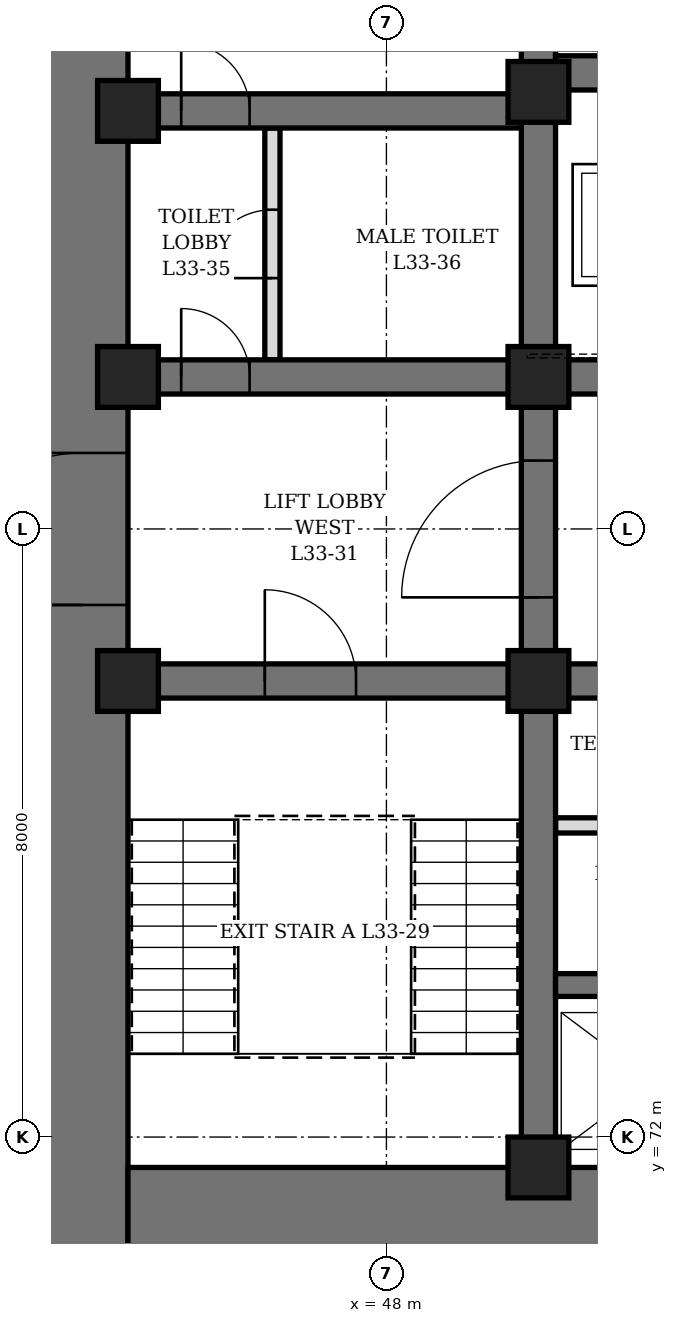
"""IFC4 building model, lengths in metres.
Left out: names, types, materials, properties, quantities, classifications, styles, units other than length and angle.
Written with IfcOpenShell. Run it as: python <this file> out.ifc"""

import sys

from ifc_helpers import new_model, si_unit, direction, frame, frame_2d, origin, origin_2d, place, context, subcontext, project, spatial, rectangle, hollow_rectangle, extrude, element, fill, save


model = new_model("IFC4")
c1 = context("Model", 3, precision=1e-05, world=origin(), true_north=direction((0.0, 1.0)))
c2 = subcontext(c1, "Body", "Model", "MODEL_VIEW")
j1 = project(units=[si_unit("LENGTHUNIT", "METRE"), si_unit("PLANEANGLEUNIT", "RADIAN")], contexts=[c1])
p1 = place(None, origin())
s1 = spatial("IfcSite", under=j1, at=p1, CompositionType="ELEMENT")
p2 = place(p1, origin())
s2 = spatial("IfcBuilding", under=s1, at=p2, CompositionType="ELEMENT")
p3 = place(p2, frame((0.0, 0.0, 150.1)))
s3 = spatial("IfcBuildingStorey", under=s2, at=p3, CompositionType="ELEMENT", Elevation=150.1)
p4 = place(p3, frame((44.0, 70.4, 0.0), z_axis=(0.0, 0.0, 1.0), x_axis=(0.0, 1.0, 0.0)))
e1 = element("IfcWall", 1, at=p4, inside=s3, PredefinedType="SHEAR", context=c2, shape_type="SweptSolid", body=[
    extrude(rectangle(XDim=19.2, YDim=1.2, at=frame_2d((9.6, 0.0))), origin(), (0.0, 0.0, 1.0), 4.2),
])
p5 = place(p4, frame((8.6, 0.0, 0.0)))
e2 = element("IfcOpeningElement", 2, at=p5, cuts=e1, PredefinedType="OPENING", context=c2, shape_type="SweptSolid", body=[
    extrude(rectangle(XDim=2.0, YDim=2.4, at=frame_2d((1.0, 1.2))), frame((0.0, 0.61, 0.0), z_axis=(0.0, -1.0, 0.0), x_axis=(1.0, 0.0, 0.0)), (0.0, 0.0, 1.0), 1.22),
])
p6 = place(p3, frame((44.6, 71.0, 0.0), z_axis=(0.0, 0.0, 1.0), x_axis=(1.0, 0.0, 0.0)))
e3 = element("IfcWall", 3, at=p6, inside=s3, PredefinedType="SHEAR", context=c2, shape_type="SweptSolid", body=[
    extrude(rectangle(XDim=22.8, YDim=1.2, at=frame_2d((11.4, 0.0))), origin(), (0.0, 0.0, 1.0), 4.2),
])
p7 = place(p3, frame((50.0, 71.6, 0.0), z_axis=(0.0, 0.0, 1.0), x_axis=(0.0, 1.0, 0.0)))
e4 = element("IfcWall", 4, at=p7, inside=s3, PredefinedType="SHEAR", context=c2, shape_type="SweptSolid", body=[
    extrude(rectangle(XDim=16.8, YDim=0.45, at=frame_2d((8.4, 0.0))), origin(), (0.0, 0.0, 1.0), 4.2),
])
p8 = place(p7, frame((7.5, 0.0, 0.0)))
e5 = element("IfcOpeningElement", 5, at=p8, cuts=e4, PredefinedType="OPENING", context=c2, shape_type="SweptSolid", body=[
    extrude(rectangle(XDim=1.8, YDim=2.4, at=frame_2d((0.9, 1.2))), frame((0.0, 0.235, 0.0), z_axis=(0.0, -1.0, 0.0), x_axis=(1.0, 0.0, 0.0)), (0.0, 0.0, 1.0), 0.47),
])
p9 = place(p3, frame((44.6, 78.0, 0.0), z_axis=(0.0, 0.0, 1.0), x_axis=(1.0, 0.0, 0.0)))
e6 = element("IfcWall", 6, at=p9, inside=s3, PredefinedType="SHEAR", context=c2, shape_type="SweptSolid", body=[
    extrude(rectangle(XDim=5.175, YDim=0.45, at=frame_2d((2.587, 0.0))), origin(), (0.0, 0.0, 1.0), 4.2),
])
p10 = place(p9, frame((1.8, 0.0, 0.0)))
e7 = element("IfcOpeningElement", 7, at=p10, cuts=e6, PredefinedType="OPENING", context=c2, shape_type="SweptSolid", body=[
    extrude(rectangle(XDim=1.2, YDim=2.1, at=frame_2d((0.6, 1.05))), frame((0.0, 0.235, 0.0), z_axis=(0.0, -1.0, 0.0), x_axis=(1.0, 0.0, 0.0)), (0.0, 0.0, 1.0), 0.47),
])
p11 = place(p3, frame((44.6, 82.0, 0.0), z_axis=(0.0, 0.0, 1.0), x_axis=(1.0, 0.0, 0.0)))
e8 = element("IfcWall", 8, at=p11, inside=s3, PredefinedType="SHEAR", context=c2, shape_type="SweptSolid", body=[
    extrude(rectangle(XDim=5.175, YDim=0.45, at=frame_2d((2.587, 0.0))), origin(), (0.0, 0.0, 1.0), 4.2),
])
p12 = place(p11, frame((0.7, 0.0, 0.0)))
e9 = element("IfcOpeningElement", 9, at=p12, cuts=e8, PredefinedType="OPENING", context=c2, shape_type="SweptSolid", body=[
    extrude(rectangle(XDim=0.9, YDim=2.1, at=frame_2d((0.45, 1.05))), frame((0.0, 0.235, 0.0), z_axis=(0.0, -1.0, 0.0), x_axis=(1.0, 0.0, 0.0)), (0.0, 0.0, 1.0), 0.47),
])
p13 = place(p3, frame((44.6, 85.5, 0.0), z_axis=(0.0, 0.0, 1.0), x_axis=(1.0, 0.0, 0.0)))
e10 = element("IfcWall", 10, at=p13, inside=s3, PredefinedType="SHEAR", context=c2, shape_type="SweptSolid", body=[
    extrude(rectangle(XDim=5.175, YDim=0.45, at=frame_2d((2.587, 0.0))), origin(), (0.0, 0.0, 1.0), 4.2),
])
p14 = place(p13, frame((0.7, 0.0, 0.0)))
e11 = element("IfcOpeningElement", 11, at=p14, cuts=e10, PredefinedType="OPENING", context=c2, shape_type="SweptSolid", body=[
    extrude(rectangle(XDim=0.9, YDim=2.1, at=frame_2d((0.45, 1.05))), frame((0.0, 0.235, 0.0), z_axis=(0.0, -1.0, 0.0), x_axis=(1.0, 0.0, 0.0)), (0.0, 0.0, 1.0), 0.47),
])
p15 = place(p3, frame((50.225, 78.0, 0.0), z_axis=(0.0, 0.0, 1.0), x_axis=(1.0, 0.0, 0.0)))
e12 = element("IfcWall", 12, at=p15, inside=s3, PredefinedType="SHEAR", context=c2, shape_type="SweptSolid", body=[
    extrude(rectangle(XDim=11.55, YDim=0.45, at=frame_2d((5.775, 0.0))), origin(), (0.0, 0.0, 1.0), 4.2),
])
p16 = place(p15, frame((0.825, 0.0, 0.0)))
e13 = element("IfcOpeningElement", 13, at=p16, cuts=e12, PredefinedType="OPENING", context=c2, shape_type="SweptSolid", body=[
    extrude(rectangle(XDim=0.9, YDim=2.1, at=frame_2d((0.45, 1.05))), frame((0.0, 0.235, 0.0), z_axis=(0.0, -1.0, 0.0), x_axis=(1.0, 0.0, 0.0)), (0.0, 0.0, 1.0), 0.47),
])
p17 = place(p15, frame((3.825, 0.0, 0.0)))
e14 = element("IfcOpeningElement", 14, at=p17, cuts=e12, PredefinedType="OPENING", context=c2, shape_type="SweptSolid", body=[
    extrude(rectangle(XDim=0.9, YDim=2.1, at=frame_2d((0.45, 1.05))), frame((0.0, 0.235, 0.0), z_axis=(0.0, -1.0, 0.0), x_axis=(1.0, 0.0, 0.0)), (0.0, 0.0, 1.0), 0.47),
])
p18 = place(p15, frame((6.825, 0.0, 0.0)))
e15 = element("IfcOpeningElement", 15, at=p18, cuts=e12, PredefinedType="OPENING", context=c2, shape_type="SweptSolid", body=[
    extrude(rectangle(XDim=0.9, YDim=2.1, at=frame_2d((0.45, 1.05))), frame((0.0, 0.235, 0.0), z_axis=(0.0, -1.0, 0.0), x_axis=(1.0, 0.0, 0.0)), (0.0, 0.0, 1.0), 0.47),
])
p19 = place(p15, frame((9.825, 0.0, 0.0)))
e16 = element("IfcOpeningElement", 16, at=p19, cuts=e12, PredefinedType="OPENING", context=c2, shape_type="SweptSolid", body=[
    extrude(rectangle(XDim=0.9, YDim=2.1, at=frame_2d((0.45, 1.05))), frame((0.0, 0.235, 0.0), z_axis=(0.0, -1.0, 0.0), x_axis=(1.0, 0.0, 0.0)), (0.0, 0.0, 1.0), 0.47),
])
p20 = place(p3, frame((50.225, 82.0, 0.0), z_axis=(0.0, 0.0, 1.0), x_axis=(1.0, 0.0, 0.0)))
e17 = element("IfcWall", 17, at=p20, inside=s3, PredefinedType="SHEAR", context=c2, shape_type="SweptSolid", body=[
    extrude(rectangle(XDim=11.55, YDim=0.45, at=frame_2d((5.775, 0.0))), origin(), (0.0, 0.0, 1.0), 4.2),
])
p21 = place(p20, frame((0.725, 0.0, 0.0)))
e18 = element("IfcOpeningElement", 18, at=p21, cuts=e17, PredefinedType="OPENING", context=c2, shape_type="SweptSolid", body=[
    extrude(rectangle(XDim=1.1, YDim=2.2, at=frame_2d((0.55, 1.1))), frame((0.0, 0.235, 0.0), z_axis=(0.0, -1.0, 0.0), x_axis=(1.0, 0.0, 0.0)), (0.0, 0.0, 1.0), 0.47),
])
p22 = place(p20, frame((3.725, 0.0, 0.0)))
e19 = element("IfcOpeningElement", 19, at=p22, cuts=e17, PredefinedType="OPENING", context=c2, shape_type="SweptSolid", body=[
    extrude(rectangle(XDim=1.1, YDim=2.2, at=frame_2d((0.55, 1.1))), frame((0.0, 0.235, 0.0), z_axis=(0.0, -1.0, 0.0), x_axis=(1.0, 0.0, 0.0)), (0.0, 0.0, 1.0), 0.47),
])
p23 = place(p20, frame((6.725, 0.0, 0.0)))
e20 = element("IfcOpeningElement", 20, at=p23, cuts=e17, PredefinedType="OPENING", context=c2, shape_type="SweptSolid", body=[
    extrude(rectangle(XDim=1.1, YDim=2.2, at=frame_2d((0.55, 1.1))), frame((0.0, 0.235, 0.0), z_axis=(0.0, -1.0, 0.0), x_axis=(1.0, 0.0, 0.0)), (0.0, 0.0, 1.0), 0.47),
])
p24 = place(p20, frame((9.725, 0.0, 0.0)))
e21 = element("IfcOpeningElement", 21, at=p24, cuts=e17, PredefinedType="OPENING", context=c2, shape_type="SweptSolid", body=[
    extrude(rectangle(XDim=1.1, YDim=2.2, at=frame_2d((0.55, 1.1))), frame((0.0, 0.235, 0.0), z_axis=(0.0, -1.0, 0.0), x_axis=(1.0, 0.0, 0.0)), (0.0, 0.0, 1.0), 0.47),
])
p25 = place(p3, frame((50.225, 86.0, 0.0), z_axis=(0.0, 0.0, 1.0), x_axis=(1.0, 0.0, 0.0)))
e22 = element("IfcWall", 22, at=p25, inside=s3, PredefinedType="SHEAR", context=c2, shape_type="SweptSolid", body=[
    extrude(rectangle(XDim=11.55, YDim=0.45, at=frame_2d((5.775, 0.0))), origin(), (0.0, 0.0, 1.0), 4.2),
])
p26 = place(p3, frame((50.225, 74.0, 0.0), z_axis=(0.0, 0.0, 1.0), x_axis=(1.0, 0.0, 0.0)))
e23 = element("IfcWall", 23, at=p26, inside=s3, PredefinedType="SHEAR", context=c2, shape_type="SweptSolid", body=[
    extrude(rectangle(XDim=11.55, YDim=0.3, at=frame_2d((5.775, 0.0))), origin(), (0.0, 0.0, 1.0), 4.2),
])
for number, where, z_axis, x_axis in (
    (24, (44.6, 78.0, 0.0), (0.0, 0.0, 1.0), (1.0, 0.0, 0.0)),
    (25, (44.6, 82.0, 0.0), (0.0, 0.0, 1.0), (1.0, 0.0, 0.0)),
    (26, (44.6, 85.5, 0.0), (0.0, 0.0, 1.0), (1.0, 0.0, 0.0)),
    (27, (50.0, 71.6, 0.0), (0.0, 0.0, 1.0), (1.0, 0.0, 0.0)),
    (28, (50.0, 78.0, 0.0), (0.0, 0.0, 1.0), (1.0, 0.0, 0.0)),
    (29, (50.0, 82.0, 0.0), (0.0, 0.0, 1.0), (1.0, 0.0, 0.0)),
    (30, (50.0, 85.75, 0.0), (0.0, 0.0, 1.0), (1.0, 0.0, 0.0)),
):
    element("IfcColumn", number, at=place(p3, frame(where, z_axis=z_axis, x_axis=x_axis)), inside=s3, PredefinedType="COLUMN", context=c2, shape_type="SweptSolid", body=[
        extrude(hollow_rectangle(XDim=0.8, YDim=0.8, WallThickness=0.1, at=origin_2d()), origin(), (0.0, 0.0, 1.0), 4.2),
    ])
p27 = place(p3, frame((46.5, 82.225, 0.0), z_axis=(0.0, 0.0, 1.0), x_axis=(0.0, 1.0, 0.0)))
e31 = element("IfcWall", 31, at=p27, inside=s3, PredefinedType="PARTITIONING", context=c2, shape_type="SweptSolid", body=[
    extrude(rectangle(XDim=3.05, YDim=0.2, at=frame_2d((1.525, 0.0))), origin(), (0.0, 0.0, 1.0), 4.04),
])
p28 = place(p27, frame((1.075, 0.0, 0.0)))
e32 = element("IfcOpeningElement", 32, at=p28, cuts=e31, PredefinedType="OPENING", context=c2, shape_type="SweptSolid", body=[
    extrude(rectangle(XDim=0.9, YDim=2.1, at=frame_2d((0.45, 1.05))), frame((0.0, 0.11, 0.0), z_axis=(0.0, -1.0, 0.0), x_axis=(1.0, 0.0, 0.0)), (0.0, 0.0, 1.0), 0.22),
])
p29 = place(p3, frame((50.225, 76.1, 0.0), z_axis=(0.0, 0.0, 1.0), x_axis=(1.0, 0.0, 0.0)))
e33 = element("IfcWall", 33, at=p29, inside=s3, PredefinedType="PARTITIONING", context=c2, shape_type="SweptSolid", body=[
    extrude(rectangle(XDim=2.55, YDim=0.2, at=frame_2d((1.275, 0.0))), origin(), (0.0, 0.0, 1.0), 4.04),
])
p30 = place(p29, frame((0.825, 0.0, 0.0)))
e34 = element("IfcOpeningElement", 34, at=p30, cuts=e33, PredefinedType="OPENING", context=c2, shape_type="SweptSolid", body=[
    extrude(rectangle(XDim=0.9, YDim=2.1, at=frame_2d((0.45, 1.05))), frame((0.0, 0.11, 0.0), z_axis=(0.0, -1.0, 0.0), x_axis=(1.0, 0.0, 0.0)), (0.0, 0.0, 1.0), 0.22),
])
p31 = place(p12, origin())
e35 = element("IfcDoor", 35, at=p31, inside=s3, OperationType="SINGLE_SWING_LEFT", PredefinedType="DOOR", context=c2, shape_type="SweptSolid", body=[
    extrude(rectangle(XDim=0.9, YDim=2.1, at=frame_2d((0.45, 1.05))), frame((0.0, 0.225, 0.0), z_axis=(0.0, -1.0, 0.0), x_axis=(1.0, 0.0, 0.0)), (0.0, 0.0, 1.0), 0.449),
])
fill(e9, e35)
p32 = place(p28, origin())
e36 = element("IfcDoor", 36, at=p32, inside=s3, OperationType="SINGLE_SWING_RIGHT", PredefinedType="DOOR", context=c2, shape_type="SweptSolid", body=[
    extrude(rectangle(XDim=0.9, YDim=2.1, at=frame_2d((0.45, 1.05))), frame((0.0, 0.1, 0.0), z_axis=(0.0, -1.0, 0.0), x_axis=(1.0, 0.0, 0.0)), (0.0, 0.0, 1.0), 0.199),
])
fill(e32, e36)
p33 = place(p14, origin())
e37 = element("IfcDoor", 37, at=p33, inside=s3, OperationType="SINGLE_SWING_RIGHT", PredefinedType="DOOR", context=c2, shape_type="SweptSolid", body=[
    extrude(rectangle(XDim=0.9, YDim=2.1, at=frame_2d((0.45, 1.05))), frame((0.0, 0.225, 0.0), z_axis=(0.0, -1.0, 0.0), x_axis=(1.0, 0.0, 0.0)), (0.0, 0.0, 1.0), 0.449),
])
fill(e11, e37)
p34 = place(p10, origin())
e38 = element("IfcDoor", 38, at=p34, inside=s3, OperationType="SINGLE_SWING_LEFT", PredefinedType="DOOR", context=c2, shape_type="SweptSolid", body=[
    extrude(rectangle(XDim=1.2, YDim=2.1, at=frame_2d((0.6, 1.05))), frame((0.0, 0.225, 0.0), z_axis=(0.0, -1.0, 0.0), x_axis=(1.0, 0.0, 0.0)), (0.0, 0.0, 1.0), 0.449),
])
fill(e7, e38)
p35 = place(p5, origin())
e39 = element("IfcDoor", 39, at=p35, inside=s3, OperationType="DOUBLE_DOOR_SINGLE_SWING", PredefinedType="DOOR", context=c2, shape_type="SweptSolid", body=[
    extrude(rectangle(XDim=2.0, YDim=2.4, at=frame_2d((1.0, 1.2))), frame((0.0, 0.35, 0.0), z_axis=(0.0, -1.0, 0.0), x_axis=(1.0, 0.0, 0.0)), (0.0, 0.0, 1.0), 0.7),
])
fill(e2, e39)
p36 = place(p8, origin())
e40 = element("IfcDoor", 40, at=p36, inside=s3, OperationType="DOUBLE_DOOR_SINGLE_SWING", PredefinedType="DOOR", context=c2, shape_type="SweptSolid", body=[
    extrude(rectangle(XDim=1.8, YDim=2.4, at=frame_2d((0.9, 1.2))), frame((0.0, 0.225, 0.0), z_axis=(0.0, -1.0, 0.0), x_axis=(1.0, 0.0, 0.0)), (0.0, 0.0, 1.0), 0.449),
])
fill(e5, e40)
save(model, sys.argv[1])
